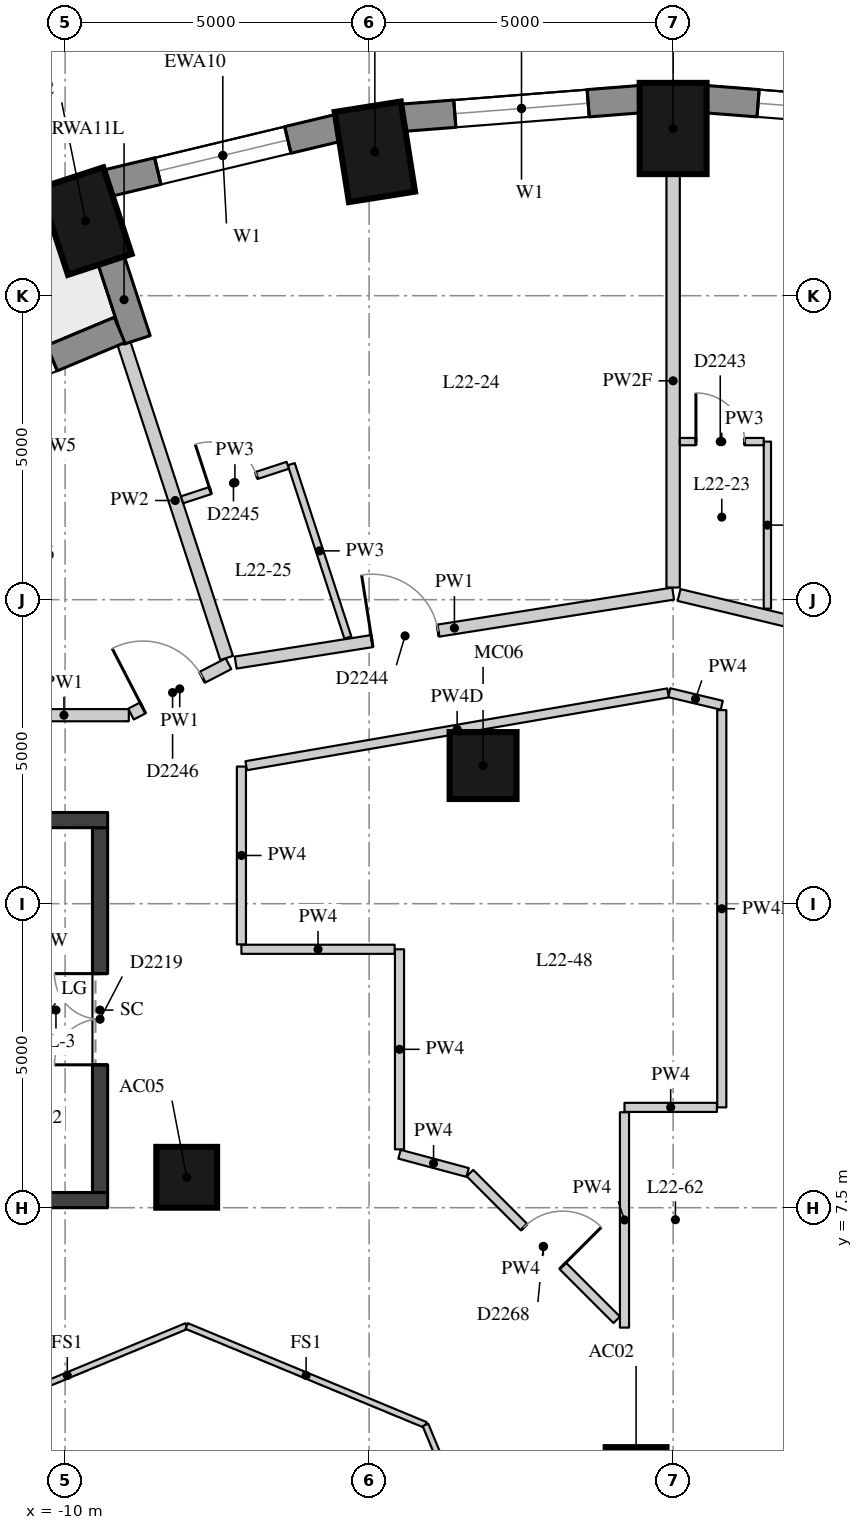
"""IFC4 building model, lengths in metres.
Left out: names, types, materials, properties, quantities, classifications, styles, units other than length and angle.
Written with IfcOpenShell. Run it as: python <this file> out.ifc"""

import sys

from ifc_helpers import new_model, si_unit, direction, frame, frame_2d, origin, origin_2d, place, context, subcontext, project, spatial, rectangle, extrude, element, fill, save


model = new_model("IFC4")
c1 = context("Model", 3, precision=1e-05, world=origin(), true_north=direction((0.0, 1.0)))
c2 = subcontext(c1, "Body", "Model", "MODEL_VIEW")
j1 = project(units=[si_unit("LENGTHUNIT", "METRE"), si_unit("PLANEANGLEUNIT", "RADIAN")], contexts=[c1])
p1 = place(None, origin())
s1 = spatial("IfcSite", under=j1, at=p1, CompositionType="ELEMENT")
p2 = place(p1, origin())
s2 = spatial("IfcBuilding", under=s1, at=p2, CompositionType="ELEMENT")
p3 = place(p2, frame((0.0, 0.0, 81.1)))
s3 = spatial("IfcBuildingStorey", under=s2, at=p3, CompositionType="ELEMENT", Elevation=81.1)
for number, where, z_axis, x_axis in (
    (1, (0.0, 25.25, 0.0), (0.0, 0.0, 1.0), (0.0, 1.0, 0.0)),
    (2, (-4.906, 24.866, 0.0), (0.0, 0.0, 1.0), (-0.156, 0.988, 0.0)),
    (3, (-9.662, 23.727, 0.0), (0.0, 0.0, 1.0), (-0.31, 0.951, 0.0)),
):
    element("IfcColumn", number, at=place(p3, frame(where, z_axis=z_axis, x_axis=x_axis)), inside=s3, PredefinedType="COLUMN", context=c2, shape_type="SweptSolid", body=[
        extrude(rectangle(XDim=1.5, YDim=1.1, at=origin_2d()), origin(), (0.0, 0.0, 1.0), 3.3),
    ])
for number, where, z_axis, x_axis in (
    (4, (-0.609, 3.062, 0.0), (0.0, 0.0, 1.0), (1.0, 0.0, 0.0)),
    (5, (-8.0, 8.0, 0.0), (0.0, 0.0, 1.0), (1.0, 0.0, 0.0)),
):
    element("IfcColumn", number, at=place(p3, frame(where, z_axis=z_axis, x_axis=x_axis)), inside=s3, PredefinedType="COLUMN", context=c2, shape_type="SweptSolid", body=[
        extrude(rectangle(XDim=1.0, YDim=1.0, at=origin_2d()), origin(), (0.0, 0.0, 1.0), 3.3),
    ])
p4 = place(p3, frame((-3.126, 14.772, 0.0), z_axis=(0.0, 0.0, 1.0), x_axis=(1.0, 0.0, 0.0)))
e6 = element("IfcColumn", 6, at=p4, inside=s3, PredefinedType="COLUMN", context=c2, shape_type="SweptSolid", body=[
    extrude(rectangle(XDim=1.1, YDim=1.1, at=origin_2d()), origin(), (0.0, 0.0, 1.0), 3.3),
])
p5 = place(p3, frame((4.457, 25.426, 0.0), z_axis=(0.0, 0.0, 1.0), x_axis=(-0.996955972145, 0.077966592873, 0.0)))
e7 = element("IfcWall", 7, at=p5, inside=s3, PredefinedType="SOLIDWALL", context=c2, shape_type="SweptSolid", body=[
    extrude(rectangle(XDim=3.939, YDim=0.45, at=frame_2d((1.97, 0.0))), origin(), (0.0, 0.0, 1.0), 2.85),
])
p6 = place(p5, frame((0.87, 0.0, 0.4)))
e8 = element("IfcOpeningElement", 8, at=p6, cuts=e7, PredefinedType="OPENING", context=c2, shape_type="SweptSolid", body=[
    extrude(rectangle(XDim=2.2, YDim=1.75, at=frame_2d((1.1, 0.875))), frame((0.0, 0.235, 0.0), z_axis=(0.0, -1.0, 0.0), x_axis=(1.0, 0.0, 0.0)), (0.0, 0.0, 1.0), 0.47),
])
p7 = place(p3, frame((-0.53, 25.733, 0.0), z_axis=(0.0, 0.0, 1.0), x_axis=(-0.996955972145, -0.077966592873, 0.0)))
e9 = element("IfcWall", 9, at=p7, inside=s3, PredefinedType="SOLIDWALL", context=c2, shape_type="SweptSolid", body=[
    extrude(rectangle(XDim=3.939, YDim=0.45, at=frame_2d((1.97, 0.0))), origin(), (0.0, 0.0, 1.0), 2.85),
])
p8 = place(p7, frame((0.87, 0.0, 0.4)))
e10 = element("IfcOpeningElement", 10, at=p8, cuts=e9, PredefinedType="OPENING", context=c2, shape_type="SweptSolid", body=[
    extrude(rectangle(XDim=2.2, YDim=1.75, at=frame_2d((1.1, 0.875))), frame((0.0, 0.235, 0.0), z_axis=(0.0, -1.0, 0.0), x_axis=(1.0, 0.0, 0.0)), (0.0, 0.0, 1.0), 0.47),
])
p9 = place(p3, frame((-5.504, 25.26, 0.0), z_axis=(0.0, 0.0, 1.0), x_axis=(-0.972496561493, -0.232917233979, 0.0)))
e11 = element("IfcWall", 11, at=p9, inside=s3, PredefinedType="SOLIDWALL", context=c2, shape_type="SweptSolid", body=[
    extrude(rectangle(XDim=3.911, YDim=0.45, at=frame_2d((1.956, 0.0))), origin(), (0.0, 0.0, 1.0), 2.85),
])
p10 = place(p9, frame((0.855, 0.0, 0.4)))
e12 = element("IfcOpeningElement", 12, at=p10, cuts=e11, PredefinedType="OPENING", context=c2, shape_type="SweptSolid", body=[
    extrude(rectangle(XDim=2.2, YDim=1.75, at=frame_2d((1.1, 0.875))), frame((0.0, 0.235, 0.0), z_axis=(0.0, -1.0, 0.0), x_axis=(1.0, 0.0, 0.0)), (0.0, 0.0, 1.0), 0.47),
])
p11 = place(p3, frame((-9.246, 23.095, 0.0), z_axis=(0.0, 0.0, 1.0), x_axis=(0.310110311429, -0.950700581017, 0.0)))
e13 = element("IfcWall", 13, at=p11, inside=s3, PredefinedType="SOLIDWALL", context=c2, shape_type="SweptSolid", body=[
    extrude(rectangle(XDim=1.39, YDim=0.45, at=frame_2d((0.695, 0.0))), origin(), (0.0, 0.0, 1.0), 2.85),
])
p12 = place(p3, frame((-9.104, 21.936, 0.0), z_axis=(0.0, 0.0, 1.0), x_axis=(-0.922645368502, -0.385649483317, 0.0)))
e14 = element("IfcWall", 14, at=p12, inside=s3, PredefinedType="SOLIDWALL", context=c2, shape_type="SweptSolid", body=[
    extrude(rectangle(XDim=4.559, YDim=0.45, at=frame_2d((2.279, 0.0))), origin(), (0.0, 0.0, 1.0), 2.85),
])
p13 = place(p12, frame((1.204, 0.0, 0.4)))
e15 = element("IfcOpeningElement", 15, at=p13, cuts=e14, PredefinedType="OPENING", context=c2, shape_type="SweptSolid", body=[
    extrude(rectangle(XDim=1.0, YDim=1.75, at=frame_2d((0.5, 0.875))), frame((0.0, 0.235, 0.0), z_axis=(0.0, -1.0, 0.0), x_axis=(1.0, 0.0, 0.0)), (0.0, 0.0, 1.0), 0.47),
])
p14 = place(p12, frame((2.354, 0.0, 0.0)))
e16 = element("IfcOpeningElement", 16, at=p14, cuts=e14, PredefinedType="OPENING", context=c2, shape_type="SweptSolid", body=[
    extrude(rectangle(XDim=1.0, YDim=2.15, at=frame_2d((0.5, 1.075))), frame((0.0, 0.235, 0.0), z_axis=(0.0, -1.0, 0.0), x_axis=(1.0, 0.0, 0.0)), (0.0, 0.0, 1.0), 0.47),
])
p15 = place(p3, frame((-9.425, 7.75, -0.28), z_axis=(0.0, 0.0, 1.0), x_axis=(0.0, 1.0, 0.0)))
e17 = element("IfcWall", 17, at=p15, inside=s3, PredefinedType="SHEAR", context=c2, shape_type="SweptSolid", body=[
    extrude(rectangle(XDim=6.0, YDim=0.25, at=frame_2d((3.0, 0.0))), origin(), (0.0, 0.0, 1.0), 3.13),
])
p16 = place(p15, frame((2.1, 0.0, 0.28)))
e18 = element("IfcOpeningElement", 18, at=p16, cuts=e17, PredefinedType="OPENING", context=c2, shape_type="SweptSolid", body=[
    extrude(rectangle(XDim=1.5, YDim=2.1, at=frame_2d((0.75, 1.05))), frame((0.0, 0.135, 0.0), z_axis=(0.0, -1.0, 0.0), x_axis=(1.0, 0.0, 0.0)), (0.0, 0.0, 1.0), 0.27),
])
for number, where, z_axis, x_axis in (
    (19, (-14.5, 13.875, -0.28), (0.0, 0.0, 1.0), (1.0, 0.0, 0.0)),
    (20, (-14.5, 7.625, -0.28), (0.0, 0.0, 1.0), (1.0, 0.0, 0.0)),
):
    element("IfcWall", number, at=place(p3, frame(where, z_axis=z_axis, x_axis=x_axis)), inside=s3, PredefinedType="SHEAR", context=c2, shape_type="SweptSolid", body=[
        extrude(rectangle(XDim=5.2, YDim=0.25, at=frame_2d((2.6, 0.0))), origin(), (0.0, 0.0, 1.0), 3.13),
    ])
p17 = place(p3, frame((-11.085, 15.6, 0.0), z_axis=(0.0, 0.0, 1.0), x_axis=(1.0, 0.0, 0.0)))
e21 = element("IfcWall", 21, at=p17, inside=s3, PredefinedType="PARTITIONING", context=c2, shape_type="SweptSolid", body=[
    extrude(rectangle(XDim=2.133, YDim=0.2, at=frame_2d((1.067, 0.0))), origin(), (0.0, 0.0, 1.0), 2.85),
])
p18 = place(p3, frame((-8.916, 15.619, 0.0), z_axis=(0.0, 0.0, 1.0), x_axis=(0.88856195521, 0.458756636741, 0.0)))
e22 = element("IfcWall", 22, at=p18, inside=s3, PredefinedType="PARTITIONING", context=c2, shape_type="SweptSolid", body=[
    extrude(rectangle(XDim=1.805, YDim=0.2, at=frame_2d((0.902, 0.0))), origin(), (0.0, 0.0, 1.0), 2.85),
])
p19 = place(p18, frame((0.22, 0.0, 0.0)))
e23 = element("IfcOpeningElement", 23, at=p19, cuts=e22, PredefinedType="OPENING", context=c2, shape_type="SweptSolid", body=[
    extrude(rectangle(XDim=1.1, YDim=2.1, at=frame_2d((0.55, 1.05))), frame((0.0, 0.11, 0.0), z_axis=(0.0, -1.0, 0.0), x_axis=(1.0, 0.0, 0.0)), (0.0, 0.0, 1.0), 0.22),
])
p20 = place(p3, frame((-7.194, 16.466, 0.0), z_axis=(0.0, 0.0, 1.0), x_axis=(0.987792302219, 0.155776659599, 0.0)))
e24 = element("IfcWall", 24, at=p20, inside=s3, PredefinedType="PARTITIONING", context=c2, shape_type="SweptSolid", body=[
    extrude(rectangle(XDim=7.283, YDim=0.2, at=frame_2d((3.642, 0.0))), origin(), (0.0, 0.0, 1.0), 2.85),
])
p21 = place(p20, frame((2.27, 0.0, 0.0)))
e25 = element("IfcOpeningElement", 25, at=p21, cuts=e24, PredefinedType="OPENING", context=c2, shape_type="SweptSolid", body=[
    extrude(rectangle(XDim=1.1, YDim=2.1, at=frame_2d((0.55, 1.05))), frame((0.0, 0.11, 0.0), z_axis=(0.0, -1.0, 0.0), x_axis=(1.0, 0.0, 0.0)), (0.0, 0.0, 1.0), 0.22),
])
p22 = place(p3, frame((0.098, 17.577, 0.0), z_axis=(0.0, 0.0, 1.0), x_axis=(0.97259262522, -0.232515774447, 0.0)))
e26 = element("IfcWall", 26, at=p22, inside=s3, PredefinedType="PARTITIONING", context=c2, shape_type="SweptSolid", body=[
    extrude(rectangle(XDim=10.838, YDim=0.2, at=frame_2d((5.419, 0.0))), origin(), (0.0, 0.0, 1.0), 2.85),
])
p23 = place(p22, frame((1.905, 0.0, 0.0)))
e27 = element("IfcOpeningElement", 27, at=p23, cuts=e26, PredefinedType="OPENING", context=c2, shape_type="SweptSolid", body=[
    extrude(rectangle(XDim=1.0, YDim=2.1, at=frame_2d((0.5, 1.05))), frame((0.0, 0.11, 0.0), z_axis=(0.0, -1.0, 0.0), x_axis=(1.0, 0.0, 0.0)), (0.0, 0.0, 1.0), 0.22),
])
p24 = place(p3, frame((-0.064, 15.97, 0.0), z_axis=(0.0, 0.0, 1.0), x_axis=(0.97258159508, -0.232561907699, 0.0)))
e28 = element("IfcWall", 28, at=p24, inside=s3, PredefinedType="PARTITIONING", context=c2, shape_type="SweptSolid", body=[
    extrude(rectangle(XDim=0.888, YDim=0.15, at=frame_2d((0.444, 0.0))), origin(), (0.0, 0.0, 1.0), 2.85),
])
p25 = place(p3, frame((0.8, 15.684, 0.0), z_axis=(0.0, 0.0, 1.0), x_axis=(0.0, -1.0, 0.0)))
e29 = element("IfcWall", 29, at=p25, inside=s3, PredefinedType="PARTITIONING", context=c2, shape_type="SweptSolid", body=[
    extrude(rectangle(XDim=6.534, YDim=0.15, at=frame_2d((3.267, 0.0))), origin(), (0.0, 0.0, 1.0), 2.3),
])
p26 = place(p3, frame((0.72, 9.15, 0.0), z_axis=(0.0, 0.0, 1.0), x_axis=(-1.0, 0.0, 0.0)))
e30 = element("IfcWall", 30, at=p26, inside=s3, PredefinedType="PARTITIONING", context=c2, shape_type="SweptSolid", body=[
    extrude(rectangle(XDim=1.52, YDim=0.15, at=frame_2d((0.76, 0.0))), origin(), (0.0, 0.0, 1.0), 2.85),
])
p27 = place(p3, frame((-0.8, 9.07, 0.0), z_axis=(0.0, 0.0, 1.0), x_axis=(0.0, -1.0, 0.0)))
e31 = element("IfcWall", 31, at=p27, inside=s3, PredefinedType="PARTITIONING", context=c2, shape_type="SweptSolid", body=[
    extrude(rectangle(XDim=3.542, YDim=0.15, at=frame_2d((1.771, 0.0))), origin(), (0.0, 0.0, 1.0), 2.85),
])
p28 = place(p3, frame((-0.927, 5.655, 0.0), z_axis=(0.0, 0.0, 1.0), x_axis=(-0.707106781187, 0.707106781187, 0.0)))
e32 = element("IfcWall", 32, at=p28, inside=s3, PredefinedType="PARTITIONING", context=c2, shape_type="SweptSolid", body=[
    extrude(rectangle(XDim=3.414, YDim=0.15, at=frame_2d((1.707, 0.0))), origin(), (0.0, 0.0, 1.0), 2.85),
])
p29 = place(p28, frame((1.257, 0.0, 0.0)))
e33 = element("IfcOpeningElement", 33, at=p29, cuts=e32, PredefinedType="OPENING", context=c2, shape_type="SweptSolid", body=[
    extrude(rectangle(XDim=0.9, YDim=2.1, at=frame_2d((0.45, 1.05))), frame((0.0, 0.085, 0.0), z_axis=(0.0, -1.0, 0.0), x_axis=(1.0, 0.0, 0.0)), (0.0, 0.0, 1.0), 0.17),
])
p30 = place(p3, frame((-3.38, 8.079, 0.0), z_axis=(0.0, 0.0, 1.0), x_axis=(-0.965891654556, 0.258946542089, 0.0)))
e34 = element("IfcWall", 34, at=p30, inside=s3, PredefinedType="PARTITIONING", context=c2, shape_type="SweptSolid", body=[
    extrude(rectangle(XDim=1.16, YDim=0.15, at=frame_2d((0.58, 0.0))), origin(), (0.0, 0.0, 1.0), 2.85),
])
p31 = place(p3, frame((-4.5, 8.46, 0.0), z_axis=(0.0, 0.0, 1.0), x_axis=(0.0, 1.0, 0.0)))
e35 = element("IfcWall", 35, at=p31, inside=s3, PredefinedType="PARTITIONING", context=c2, shape_type="SweptSolid", body=[
    extrude(rectangle(XDim=3.29, YDim=0.15, at=frame_2d((1.645, 0.0))), origin(), (0.0, 0.0, 1.0), 2.85),
])
p32 = place(p3, frame((-4.58, 11.75, 0.0), z_axis=(0.0, 0.0, 1.0), x_axis=(-1.0, 0.0, 0.0)))
e36 = element("IfcWall", 36, at=p32, inside=s3, PredefinedType="PARTITIONING", context=c2, shape_type="SweptSolid", body=[
    extrude(rectangle(XDim=2.52, YDim=0.15, at=frame_2d((1.26, 0.0))), origin(), (0.0, 0.0, 1.0), 2.85),
])
p33 = place(p3, frame((-7.1, 11.83, 0.0), z_axis=(0.0, 0.0, 1.0), x_axis=(0.0, 1.0, 0.0)))
e37 = element("IfcWall", 37, at=p33, inside=s3, PredefinedType="PARTITIONING", context=c2, shape_type="SweptSolid", body=[
    extrude(rectangle(XDim=2.926, YDim=0.15, at=frame_2d((1.463, 0.0))), origin(), (0.0, 0.0, 1.0), 2.85),
])
p34 = place(p3, frame((-7.021, 14.769, 0.0), z_axis=(0.0, 0.0, 1.0), x_axis=(0.985427060344, 0.170098526569, 0.0)))
e38 = element("IfcWall", 38, at=p34, inside=s3, PredefinedType="PARTITIONING", context=c2, shape_type="SweptSolid", body=[
    extrude(rectangle(XDim=7.04, YDim=0.15, at=frame_2d((3.52, 0.0))), origin(), (0.0, 0.0, 1.0), 2.4),
])
p35 = place(p3, frame((0.0, 24.5, 0.0), z_axis=(0.0, 0.0, 1.0), x_axis=(0.0, -1.0, 0.0)))
e39 = element("IfcWall", 39, at=p35, inside=s3, PredefinedType="PARTITIONING", context=c2, shape_type="SweptSolid", body=[
    extrude(rectangle(XDim=6.8, YDim=0.22, at=frame_2d((3.4, 0.0))), origin(), (0.0, 0.0, 1.0), 2.3),
])
p36 = place(p3, frame((-9.034, 21.721, 0.0), z_axis=(0.0, 0.0, 1.0), x_axis=(0.310306747299, -0.950636482879, 0.0)))
e40 = element("IfcWall", 40, at=p36, inside=s3, PredefinedType="PARTITIONING", context=c2, shape_type="SweptSolid", body=[
    extrude(rectangle(XDim=5.448, YDim=0.22, at=frame_2d((2.724, 0.0))), origin(), (0.0, 0.0, 1.0), 2.85),
])
p37 = place(p3, frame((1.55, 17.352, 0.0), z_axis=(0.0, 0.0, 1.0), x_axis=(0.0, 1.0, 0.0)))
e41 = element("IfcWall", 41, at=p37, inside=s3, PredefinedType="PARTITIONING", context=c2, shape_type="SweptSolid", body=[
    extrude(rectangle(XDim=2.748, YDim=0.12, at=frame_2d((1.374, 0.0))), origin(), (0.0, 0.0, 1.0), 2.85),
])
p38 = place(p3, frame((-5.35, 16.877, 0.0), z_axis=(0.0, 0.0, 1.0), x_axis=(-0.310214130591, 0.950666709832, 0.0)))
e42 = element("IfcWall", 42, at=p38, inside=s3, PredefinedType="PARTITIONING", context=c2, shape_type="SweptSolid", body=[
    extrude(rectangle(XDim=2.999, YDim=0.12, at=frame_2d((1.5, 0.0))), origin(), (0.0, 0.0, 1.0), 2.85),
])
p39 = place(p3, frame((1.49, 20.1, 0.0), z_axis=(0.0, 0.0, 1.0), x_axis=(-1.0, 0.0, 0.0)))
e43 = element("IfcWall", 43, at=p39, inside=s3, PredefinedType="PARTITIONING", context=c2, shape_type="SweptSolid", body=[
    extrude(rectangle(XDim=1.38, YDim=0.12, at=frame_2d((0.69, 0.0))), origin(), (0.0, 0.0, 1.0), 2.85),
])
p40 = place(p39, frame((0.315, 0.0, 0.0)))
e44 = element("IfcOpeningElement", 44, at=p40, cuts=e43, PredefinedType="OPENING", context=c2, shape_type="SweptSolid", body=[
    extrude(rectangle(XDim=0.8, YDim=2.1, at=frame_2d((0.4, 1.05))), frame((0.0, 0.07, 0.0), z_axis=(0.0, -1.0, 0.0), x_axis=(1.0, 0.0, 0.0)), (0.0, 0.0, 1.0), 0.14),
])
p41 = place(p3, frame((-6.337, 19.71, 0.0), z_axis=(0.0, 0.0, 1.0), x_axis=(-0.950626343776, -0.310337807105, 0.0)))
e45 = element("IfcWall", 45, at=p41, inside=s3, PredefinedType="PARTITIONING", context=c2, shape_type="SweptSolid", body=[
    extrude(rectangle(XDim=1.83, YDim=0.12, at=frame_2d((0.915, 0.0))), origin(), (0.0, 0.0, 1.0), 2.85),
])
p42 = place(p41, frame((0.54, 0.0, 0.0)))
e46 = element("IfcOpeningElement", 46, at=p42, cuts=e45, PredefinedType="OPENING", context=c2, shape_type="SweptSolid", body=[
    extrude(rectangle(XDim=0.8, YDim=2.1, at=frame_2d((0.4, 1.05))), frame((0.0, 0.07, 0.0), z_axis=(0.0, -1.0, 0.0), x_axis=(1.0, 0.0, 0.0)), (0.0, 0.0, 1.0), 0.14),
])
for number, where, z_axis, x_axis in (
    (47, (-11.927, 3.927, 0.0), (0.0, 0.0, 1.0), (0.924, 0.383, 0.0)),
    (48, (-8.0, 5.554, 0.0), (0.0, 0.0, 1.0), (0.924, -0.383, 0.0)),
    (49, (-4.073, 3.927, 0.0), (0.0, 0.0, 1.0), (0.383, -0.924, 0.0)),
):
    element("IfcWall", number, at=place(p3, frame(where, z_axis=z_axis, x_axis=x_axis)), inside=s3, PredefinedType="PARTITIONING", context=c2, shape_type="SweptSolid", body=[
        extrude(rectangle(XDim=4.251, YDim=0.1, at=frame_2d((2.125, 0.0))), origin(), (0.0, 0.0, 1.0), 2.85),
    ])
p43 = place(p6, origin())
e50 = element("IfcWindow", 50, at=p43, inside=s3, PartitioningType="SINGLE_PANEL", PredefinedType="WINDOW", context=c2, shape_type="SweptSolid", body=[
    extrude(rectangle(XDim=2.2, YDim=1.75, at=frame_2d((1.1, 0.875))), frame((0.0, 0.035, 0.0), z_axis=(0.0, -1.0, 0.0), x_axis=(1.0, 0.0, 0.0)), (0.0, 0.0, 1.0), 0.06),
])
fill(e8, e50)
p44 = place(p8, origin())
e51 = element("IfcWindow", 51, at=p44, inside=s3, PartitioningType="SINGLE_PANEL", PredefinedType="WINDOW", context=c2, shape_type="SweptSolid", body=[
    extrude(rectangle(XDim=2.2, YDim=1.75, at=frame_2d((1.1, 0.875))), frame((0.0, 0.035, 0.0), z_axis=(0.0, -1.0, 0.0), x_axis=(1.0, 0.0, 0.0)), (0.0, 0.0, 1.0), 0.06),
])
fill(e10, e51)
p45 = place(p10, origin())
e52 = element("IfcWindow", 52, at=p45, inside=s3, PartitioningType="SINGLE_PANEL", PredefinedType="WINDOW", context=c2, shape_type="SweptSolid", body=[
    extrude(rectangle(XDim=2.2, YDim=1.75, at=frame_2d((1.1, 0.875))), frame((0.0, 0.035, 0.0), z_axis=(0.0, -1.0, 0.0), x_axis=(1.0, 0.0, 0.0)), (0.0, 0.0, 1.0), 0.06),
])
fill(e12, e52)
p46 = place(p13, origin())
e53 = element("IfcWindow", 53, at=p46, inside=s3, PartitioningType="SINGLE_PANEL", PredefinedType="WINDOW", context=c2, shape_type="SweptSolid", body=[
    extrude(rectangle(XDim=1.0, YDim=1.75, at=frame_2d((0.5, 0.875))), frame((0.0, 0.035, 0.0), z_axis=(0.0, -1.0, 0.0), x_axis=(1.0, 0.0, 0.0)), (0.0, 0.0, 1.0), 0.06),
])
fill(e15, e53)
p47 = place(p16, origin())
e54 = element("IfcDoor", 54, at=p47, inside=s3, OperationType="DOUBLE_DOOR_SINGLE_SWING", PredefinedType="DOOR", context=c2, shape_type="SweptSolid", body=[
    extrude(rectangle(XDim=1.5, YDim=2.1, at=frame_2d((0.75, 1.05))), frame((0.0, 0.025, 0.0), z_axis=(0.0, -1.0, 0.0), x_axis=(1.0, 0.0, 0.0)), (0.0, 0.0, 1.0), 0.05),
])
fill(e18, e54)
p48 = place(p40, origin())
e55 = element("IfcDoor", 55, at=p48, inside=s3, OperationType="SINGLE_SWING_LEFT", PredefinedType="DOOR", context=c2, shape_type="SweptSolid", body=[
    extrude(rectangle(XDim=0.8, YDim=2.1, at=frame_2d((0.4, 1.05))), frame((0.0, 0.025, 0.0), z_axis=(0.0, -1.0, 0.0), x_axis=(1.0, 0.0, 0.0)), (0.0, 0.0, 1.0), 0.05),
])
fill(e44, e55)
p49 = place(p21, origin())
e56 = element("IfcDoor", 56, at=p49, inside=s3, OperationType="SINGLE_SWING_LEFT", PredefinedType="DOOR", context=c2, shape_type="SweptSolid", body=[
    extrude(rectangle(XDim=1.1, YDim=2.1, at=frame_2d((0.55, 1.05))), frame((0.0, 0.025, 0.0), z_axis=(0.0, -1.0, 0.0), x_axis=(1.0, 0.0, 0.0)), (0.0, 0.0, 1.0), 0.05),
])
fill(e25, e56)
p50 = place(p42, origin())
e57 = element("IfcDoor", 57, at=p50, inside=s3, OperationType="SINGLE_SWING_LEFT", PredefinedType="DOOR", context=c2, shape_type="SweptSolid", body=[
    extrude(rectangle(XDim=0.8, YDim=2.1, at=frame_2d((0.4, 1.05))), frame((0.0, 0.025, 0.0), z_axis=(0.0, -1.0, 0.0), x_axis=(1.0, 0.0, 0.0)), (0.0, 0.0, 1.0), 0.05),
])
fill(e46, e57)
p51 = place(p19, origin())
e58 = element("IfcDoor", 58, at=p51, inside=s3, OperationType="SINGLE_SWING_LEFT", PredefinedType="DOOR", context=c2, shape_type="SweptSolid", body=[
    extrude(rectangle(XDim=1.1, YDim=2.1, at=frame_2d((0.55, 1.05))), frame((0.0, 0.025, 0.0), z_axis=(0.0, -1.0, 0.0), x_axis=(1.0, 0.0, 0.0)), (0.0, 0.0, 1.0), 0.05),
])
fill(e23, e58)
p52 = place(p29, origin())
e59 = element("IfcDoor", 59, at=p52, inside=s3, OperationType="SINGLE_SWING_RIGHT", PredefinedType="DOOR", context=c2, shape_type="SweptSolid", body=[
    extrude(rectangle(XDim=0.9, YDim=2.1, at=frame_2d((0.45, 1.05))), frame((0.0, 0.025, 0.0), z_axis=(0.0, -1.0, 0.0), x_axis=(1.0, 0.0, 0.0)), (0.0, 0.0, 1.0), 0.05),
])
fill(e33, e59)
save(model, sys.argv[1])
